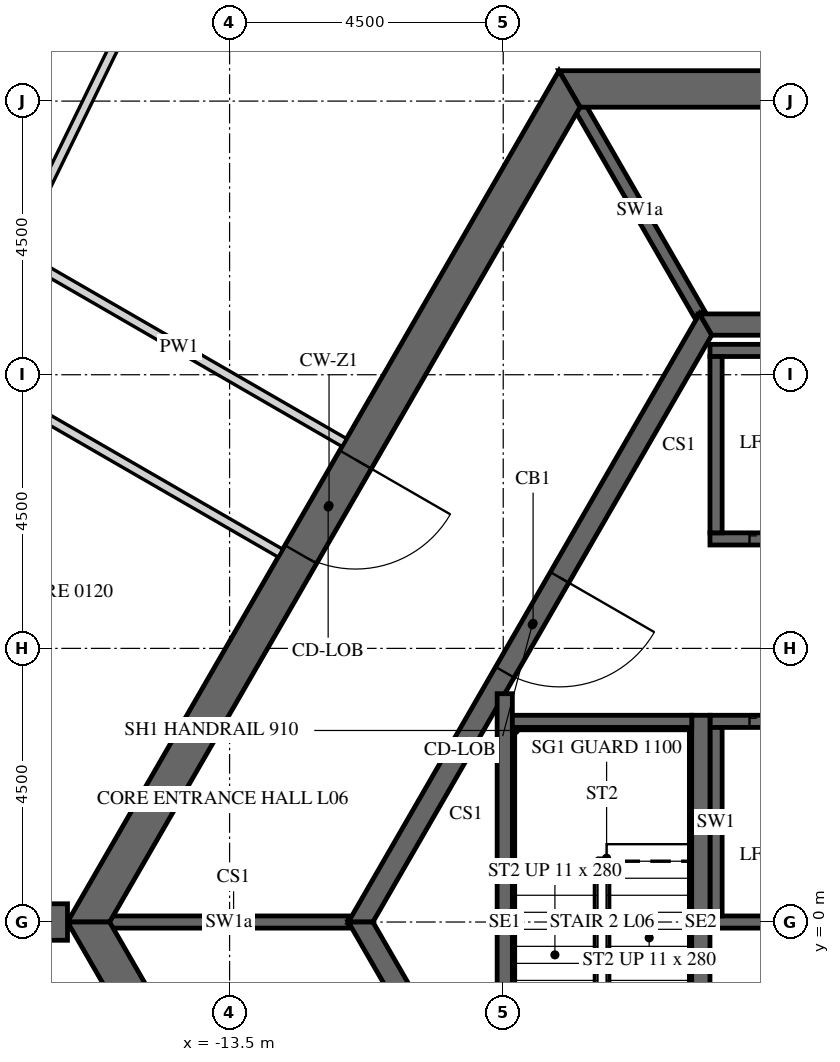
"""IFC4 building model, lengths in metres.
Left out: names, types, materials, properties, quantities, classifications, styles, units other than length and angle.
Written with IfcOpenShell. Run it as: python <this file> out.ifc"""

import sys

from ifc_helpers import new_model, si_unit, direction, frame, frame_2d, origin, place, context, subcontext, project, spatial, polyline, rectangle, outline, extrude, element, fill, save


model = new_model("IFC4")
c1 = context("Model", 3, precision=1e-05, world=origin(), true_north=direction((0.0, 1.0)))
c2 = subcontext(c1, "Body", "Model", "MODEL_VIEW")
j1 = project(units=[si_unit("LENGTHUNIT", "METRE"), si_unit("PLANEANGLEUNIT", "RADIAN")], contexts=[c1])
p1 = place(None, origin())
s1 = spatial("IfcSite", under=j1, at=p1, CompositionType="ELEMENT")
p2 = place(p1, origin())
s2 = spatial("IfcBuilding", under=s1, at=p2, CompositionType="ELEMENT")
p3 = place(p2, frame((0.0, 0.0, 37.5)))
s3 = spatial("IfcBuildingStorey", under=s2, at=p3, CompositionType="ELEMENT", Elevation=37.5)
p4 = place(p3, frame((-7.91, 13.7, -0.15), z_axis=(0.0, 0.0, 1.0), x_axis=(-0.499999880136, -0.866025472988, 0.0)))
e1 = element("IfcWall", 1, at=p4, inside=s3, PredefinedType="SHEAR", context=c2, shape_type="SweptSolid", body=[
    extrude(outline(polyline([(-0.173, -0.3), (15.993, -0.3), (15.646, 0.3), (0.173, 0.3), (-0.173, -0.3)])), origin(), (0.0, 0.0, 1.0), 3.9),
])
p5 = place(p4, frame((7.039, 0.0, 0.15)))
e2 = element("IfcOpeningElement", 2, at=p5, cuts=e1, PredefinedType="OPENING", context=c2, shape_type="SweptSolid", body=[
    extrude(rectangle(XDim=1.8, YDim=2.4, at=frame_2d((0.9, 1.2))), frame((0.0, 0.31, 0.0), z_axis=(0.0, -1.0, 0.0), x_axis=(1.0, 0.0, 0.0)), (0.0, 0.0, 1.0), 0.62),
])
p6 = place(p3, frame((-15.819, 0.0, -0.15), z_axis=(0.0, 0.0, 1.0), x_axis=(0.499999880136, -0.866025472988, 0.0)))
e3 = element("IfcWall", 3, at=p6, inside=s3, PredefinedType="SHEAR", context=c2, shape_type="SweptSolid", body=[
    extrude(outline(polyline([(-0.173, -0.3), (15.993, -0.3), (15.646, 0.3), (0.173, 0.3), (-0.173, -0.3)])), origin(), (0.0, 0.0, 1.0), 3.9),
])
p7 = place(p6, frame((6.981, 0.0, 0.15)))
e4 = element("IfcOpeningElement", 4, at=p7, cuts=e3, PredefinedType="OPENING", context=c2, shape_type="SweptSolid", body=[
    extrude(rectangle(XDim=1.8, YDim=2.4, at=frame_2d((0.9, 1.2))), frame((0.0, 0.31, 0.0), z_axis=(0.0, -1.0, 0.0), x_axis=(1.0, 0.0, 0.0)), (0.0, 0.0, 1.0), 0.62),
])
p8 = place(p3, frame((7.91, 13.7, -0.15), z_axis=(0.0, 0.0, 1.0), x_axis=(-1.0, 0.0, 0.0)))
e5 = element("IfcWall", 5, at=p8, inside=s3, PredefinedType="SHEAR", context=c2, shape_type="SweptSolid", body=[
    extrude(outline(polyline([(-0.173, -0.3), (15.993, -0.3), (15.646, 0.3), (0.173, 0.3), (-0.173, -0.3)])), origin(), (0.0, 0.0, 1.0), 3.9),
])
p9 = place(p8, frame((7.31, 0.0, 0.15)))
e6 = element("IfcOpeningElement", 6, at=p9, cuts=e5, PredefinedType="OPENING", context=c2, shape_type="SweptSolid", body=[
    extrude(rectangle(XDim=1.2, YDim=2.4, at=frame_2d((0.6, 1.2))), frame((0.0, 0.31, 0.0), z_axis=(0.0, -1.0, 0.0), x_axis=(1.0, 0.0, 0.0)), (0.0, 0.0, 1.0), 0.62),
])
p10 = place(p3, frame((-16.166, 0.0, -0.15), z_axis=(0.0, 0.0, 1.0), x_axis=(-1.0, 0.0, 0.0)))
e7 = element("IfcWall", 7, at=p10, inside=s3, PredefinedType="SHEAR", context=c2, shape_type="SweptSolid", body=[
    extrude(rectangle(XDim=16.509, YDim=0.6, at=frame_2d((8.254, 0.0))), origin(), (0.0, 0.0, 1.0), 3.9),
])
p11 = place(p10, frame((7.354, 0.0, 0.15)))
e8 = element("IfcOpeningElement", 8, at=p11, cuts=e7, PredefinedType="OPENING", context=c2, shape_type="SweptSolid", body=[
    extrude(rectangle(XDim=1.8, YDim=2.4, at=frame_2d((0.9, 1.2))), frame((0.0, 0.31, 0.0), z_axis=(0.0, -1.0, 0.0), x_axis=(1.0, 0.0, 0.0)), (0.0, 0.0, 1.0), 0.62),
])
p12 = place(p3, frame((-5.673, 9.825, -0.15), z_axis=(0.0, 0.0, 1.0), x_axis=(-0.499995046907, -0.866028263435, 0.0)))
e9 = element("IfcWall", 9, at=p12, inside=s3, PredefinedType="SHEAR", context=c2, shape_type="SweptSolid", body=[
    extrude(outline(polyline([(-0.101, -0.175), (11.446, -0.175), (11.244, 0.175), (0.101, 0.175), (-0.101, -0.175)])), origin(), (0.0, 0.0, 1.0), 3.9),
])
p13 = place(p12, frame((4.801, 0.0, 0.15)))
e10 = element("IfcOpeningElement", 10, at=p13, cuts=e9, PredefinedType="OPENING", context=c2, shape_type="SweptSolid", body=[
    extrude(rectangle(XDim=1.8, YDim=2.4, at=frame_2d((0.9, 1.2))), frame((0.0, 0.185, 0.0), z_axis=(0.0, -1.0, 0.0), x_axis=(1.0, 0.0, 0.0)), (0.0, 0.0, 1.0), 0.37),
])
p14 = place(p3, frame((-11.345, 0.0, -0.15), z_axis=(0.0, 0.0, 1.0), x_axis=(0.499995046907, -0.866028263435, 0.0)))
e11 = element("IfcWall", 11, at=p14, inside=s3, PredefinedType="SHEAR", context=c2, shape_type="SweptSolid", body=[
    extrude(outline(polyline([(-0.101, -0.175), (11.446, -0.175), (11.244, 0.175), (0.101, 0.175), (-0.101, -0.175)])), origin(), (0.0, 0.0, 1.0), 3.9),
])
p15 = place(p14, frame((4.744, 0.0, 0.15)))
e12 = element("IfcOpeningElement", 12, at=p15, cuts=e11, PredefinedType="OPENING", context=c2, shape_type="SweptSolid", body=[
    extrude(rectangle(XDim=1.8, YDim=2.4, at=frame_2d((0.9, 1.2))), frame((0.0, 0.185, 0.0), z_axis=(0.0, -1.0, 0.0), x_axis=(1.0, 0.0, 0.0)), (0.0, 0.0, 1.0), 0.37),
])
p16 = place(p3, frame((5.673, 9.825, -0.15), z_axis=(0.0, 0.0, 1.0), x_axis=(-1.0, 0.0, 0.0)))
e13 = element("IfcWall", 13, at=p16, inside=s3, PredefinedType="SHEAR", context=c2, shape_type="SweptSolid", body=[
    extrude(outline(polyline([(-0.101, -0.175), (11.446, -0.175), (11.244, 0.175), (0.101, 0.175), (-0.101, -0.175)])), origin(), (0.0, 0.0, 1.0), 3.9),
])
p17 = place(p3, frame((-5.6, 6.3, -0.25), z_axis=(0.0, 0.0, 1.0), x_axis=(1.0, 0.0, 0.0)))
e14 = element("IfcWall", 14, at=p17, inside=s3, PredefinedType="SHEAR", context=c2, shape_type="SweptSolid", body=[
    extrude(rectangle(XDim=11.2, YDim=0.2, at=frame_2d((5.6, 0.0))), origin(), (0.0, 0.0, 1.0), 3.9),
])
p18 = place(p17, frame((0.65, 0.0, 0.25)))
e15 = element("IfcOpeningElement", 15, at=p18, cuts=e14, PredefinedType="OPENING", context=c2, shape_type="SweptSolid", body=[
    extrude(rectangle(XDim=1.1, YDim=2.1, at=frame_2d((0.55, 1.05))), frame((0.0, 0.11, 0.0), z_axis=(0.0, -1.0, 0.0), x_axis=(1.0, 0.0, 0.0)), (0.0, 0.0, 1.0), 0.22),
])
p19 = place(p17, frame((2.85, 0.0, 0.25)))
e16 = element("IfcOpeningElement", 16, at=p19, cuts=e14, PredefinedType="OPENING", context=c2, shape_type="SweptSolid", body=[
    extrude(rectangle(XDim=1.1, YDim=2.1, at=frame_2d((0.55, 1.05))), frame((0.0, 0.11, 0.0), z_axis=(0.0, -1.0, 0.0), x_axis=(1.0, 0.0, 0.0)), (0.0, 0.0, 1.0), 0.22),
])
p20 = place(p17, frame((5.05, 0.0, 0.25)))
e17 = element("IfcOpeningElement", 17, at=p20, cuts=e14, PredefinedType="OPENING", context=c2, shape_type="SweptSolid", body=[
    extrude(rectangle(XDim=1.1, YDim=2.1, at=frame_2d((0.55, 1.05))), frame((0.0, 0.11, 0.0), z_axis=(0.0, -1.0, 0.0), x_axis=(1.0, 0.0, 0.0)), (0.0, 0.0, 1.0), 0.22),
])
p21 = place(p17, frame((7.25, 0.0, 0.25)))
e18 = element("IfcOpeningElement", 18, at=p21, cuts=e14, PredefinedType="OPENING", context=c2, shape_type="SweptSolid", body=[
    extrude(rectangle(XDim=1.1, YDim=2.1, at=frame_2d((0.55, 1.05))), frame((0.0, 0.11, 0.0), z_axis=(0.0, -1.0, 0.0), x_axis=(1.0, 0.0, 0.0)), (0.0, 0.0, 1.0), 0.22),
])
p22 = place(p17, frame((9.45, 0.0, 0.25)))
e19 = element("IfcOpeningElement", 19, at=p22, cuts=e14, PredefinedType="OPENING", context=c2, shape_type="SweptSolid", body=[
    extrude(rectangle(XDim=1.1, YDim=2.1, at=frame_2d((0.55, 1.05))), frame((0.0, 0.11, 0.0), z_axis=(0.0, -1.0, 0.0), x_axis=(1.0, 0.0, 0.0)), (0.0, 0.0, 1.0), 0.22),
])
p23 = place(p3, frame((-5.6, 9.4, -0.25), z_axis=(0.0, 0.0, 1.0), x_axis=(1.0, 0.0, 0.0)))
e20 = element("IfcWall", 20, at=p23, inside=s3, PredefinedType="SHEAR", context=c2, shape_type="SweptSolid", body=[
    extrude(rectangle(XDim=11.2, YDim=0.2, at=frame_2d((5.6, 0.0))), origin(), (0.0, 0.0, 1.0), 3.9),
])
p24 = place(p3, frame((-5.5, 6.4, -0.25), z_axis=(0.0, 0.0, 1.0), x_axis=(0.0, 1.0, 0.0)))
e21 = element("IfcWall", 21, at=p24, inside=s3, PredefinedType="SHEAR", context=c2, shape_type="SweptSolid", body=[
    extrude(rectangle(XDim=2.9, YDim=0.2, at=frame_2d((1.45, 0.0))), origin(), (0.0, 0.0, 1.0), 3.9),
])
p25 = place(p3, frame((-5.6, 3.3, -0.25), z_axis=(0.0, 0.0, 1.0), x_axis=(1.0, 0.0, 0.0)))
e22 = element("IfcWall", 22, at=p25, inside=s3, PredefinedType="SHEAR", context=c2, shape_type="SweptSolid", body=[
    extrude(rectangle(XDim=11.2, YDim=0.2, at=frame_2d((5.6, 0.0))), origin(), (0.0, 0.0, 1.0), 3.9),
])
p26 = place(p25, frame((0.65, 0.0, 0.25)))
e23 = element("IfcOpeningElement", 23, at=p26, cuts=e22, PredefinedType="OPENING", context=c2, shape_type="SweptSolid", body=[
    extrude(rectangle(XDim=1.1, YDim=2.1, at=frame_2d((0.55, 1.05))), frame((0.0, 0.11, 0.0), z_axis=(0.0, -1.0, 0.0), x_axis=(1.0, 0.0, 0.0)), (0.0, 0.0, 1.0), 0.22),
])
p27 = place(p25, frame((2.85, 0.0, 0.25)))
e24 = element("IfcOpeningElement", 24, at=p27, cuts=e22, PredefinedType="OPENING", context=c2, shape_type="SweptSolid", body=[
    extrude(rectangle(XDim=1.1, YDim=2.1, at=frame_2d((0.55, 1.05))), frame((0.0, 0.11, 0.0), z_axis=(0.0, -1.0, 0.0), x_axis=(1.0, 0.0, 0.0)), (0.0, 0.0, 1.0), 0.22),
])
p28 = place(p25, frame((5.05, 0.0, 0.25)))
e25 = element("IfcOpeningElement", 25, at=p28, cuts=e22, PredefinedType="OPENING", context=c2, shape_type="SweptSolid", body=[
    extrude(rectangle(XDim=1.1, YDim=2.1, at=frame_2d((0.55, 1.05))), frame((0.0, 0.11, 0.0), z_axis=(0.0, -1.0, 0.0), x_axis=(1.0, 0.0, 0.0)), (0.0, 0.0, 1.0), 0.22),
])
p29 = place(p25, frame((7.25, 0.0, 0.25)))
e26 = element("IfcOpeningElement", 26, at=p29, cuts=e22, PredefinedType="OPENING", context=c2, shape_type="SweptSolid", body=[
    extrude(rectangle(XDim=1.1, YDim=2.1, at=frame_2d((0.55, 1.05))), frame((0.0, 0.11, 0.0), z_axis=(0.0, -1.0, 0.0), x_axis=(1.0, 0.0, 0.0)), (0.0, 0.0, 1.0), 0.22),
])
p30 = place(p25, frame((9.45, 0.0, 0.25)))
e27 = element("IfcOpeningElement", 27, at=p30, cuts=e22, PredefinedType="OPENING", context=c2, shape_type="SweptSolid", body=[
    extrude(rectangle(XDim=1.1, YDim=2.1, at=frame_2d((0.55, 1.05))), frame((0.0, 0.11, 0.0), z_axis=(0.0, -1.0, 0.0), x_axis=(1.0, 0.0, 0.0)), (0.0, 0.0, 1.0), 0.22),
])
p31 = place(p3, frame((-5.6, 0.0, -0.25), z_axis=(0.0, 0.0, 1.0), x_axis=(1.0, 0.0, 0.0)))
e28 = element("IfcWall", 28, at=p31, inside=s3, PredefinedType="SHEAR", context=c2, shape_type="SweptSolid", body=[
    extrude(rectangle(XDim=11.2, YDim=0.2, at=frame_2d((5.6, 0.0))), origin(), (0.0, 0.0, 1.0), 3.9),
])
p32 = place(p3, frame((-5.5, 0.1, -0.25), z_axis=(0.0, 0.0, 1.0), x_axis=(0.0, 1.0, 0.0)))
e29 = element("IfcWall", 29, at=p32, inside=s3, PredefinedType="SHEAR", context=c2, shape_type="SweptSolid", body=[
    extrude(rectangle(XDim=3.1, YDim=0.2, at=frame_2d((1.55, 0.0))), origin(), (0.0, 0.0, 1.0), 3.9),
])
p33 = place(p3, frame((-5.773, 10.0, -0.15), z_axis=(0.0, 0.0, 1.0), x_axis=(-0.500038251005, 0.86600331843, 0.0)))
e30 = element("IfcWall", 30, at=p33, inside=s3, PredefinedType="SHEAR", context=c2, shape_type="SweptSolid", body=[
    extrude(rectangle(XDim=3.926, YDim=0.2, at=frame_2d((1.963, 0.0))), origin(), (0.0, 0.0, 1.0), 3.9),
])
p34 = place(p3, frame((-11.547, 0.0, -0.15), z_axis=(0.0, 0.0, 1.0), x_axis=(-1.0, 0.0, 0.0)))
e31 = element("IfcWall", 31, at=p34, inside=s3, PredefinedType="SHEAR", context=c2, shape_type="SweptSolid", body=[
    extrude(rectangle(XDim=3.926, YDim=0.2, at=frame_2d((1.963, 0.0))), origin(), (0.0, 0.0, 1.0), 3.9),
])
p35 = place(p3, frame((-5.75, -3.4, -0.25), z_axis=(0.0, 0.0, 1.0), x_axis=(0.0, 1.0, 0.0)))
e32 = element("IfcWall", 32, at=p35, inside=s3, PredefinedType="SHEAR", context=c2, shape_type="SweptSolid", body=[
    extrude(rectangle(XDim=6.8, YDim=0.3, at=frame_2d((3.4, 0.0))), origin(), (0.0, 0.0, 1.0), 3.9),
])
p36 = place(p3, frame((-8.975, -3.755, -0.25), z_axis=(0.0, 0.0, 1.0), x_axis=(0.0, 1.0, 0.0)))
e33 = element("IfcWall", 33, at=p36, inside=s3, PredefinedType="SHEAR", context=c2, shape_type="SweptSolid", body=[
    extrude(rectangle(XDim=7.51, YDim=0.25, at=frame_2d((3.755, 0.0))), origin(), (0.0, 0.0, 1.0), 3.9),
])
p37 = place(p3, frame((-8.85, 3.3, -0.25), z_axis=(0.0, 0.0, 1.0), x_axis=(1.0, 0.0, 0.0)))
e34 = element("IfcWall", 34, at=p37, inside=s3, PredefinedType="SHEAR", context=c2, shape_type="SweptSolid", body=[
    extrude(rectangle(XDim=2.95, YDim=0.2, at=frame_2d((1.475, 0.0))), origin(), (0.0, 0.0, 1.0), 3.9),
])
p38 = place(p3, frame((-13.752, 21.875, 0.0), z_axis=(0.0, 0.0, 1.0), x_axis=(-0.438374473378, -0.898792423806, 0.0)))
e35 = element("IfcWall", 35, at=p38, inside=s3, PredefinedType="PARTITIONING", context=c2, shape_type="SweptSolid", body=[
    extrude(rectangle(XDim=21.918, YDim=0.15, at=frame_2d((10.959, 0.0))), origin(), (0.0, 0.0, 1.0), 2.988),
])
p39 = place(p38, frame((9.521, 0.0, 0.0)))
e36 = element("IfcOpeningElement", 36, at=p39, cuts=e35, PredefinedType="OPENING", context=c2, shape_type="SweptSolid", body=[
    extrude(rectangle(XDim=1.0, YDim=2.1, at=frame_2d((0.5, 1.05))), frame((0.0, 0.085, 0.0), z_axis=(0.0, -1.0, 0.0), x_axis=(1.0, 0.0, 0.0)), (0.0, 0.0, 1.0), 0.17),
])
p40 = place(p38, frame((17.211, 0.0, 0.0)))
e37 = element("IfcOpeningElement", 37, at=p40, cuts=e35, PredefinedType="OPENING", context=c2, shape_type="SweptSolid", body=[
    extrude(rectangle(XDim=1.0, YDim=2.1, at=frame_2d((0.5, 1.05))), frame((0.0, 0.085, 0.0), z_axis=(0.0, -1.0, 0.0), x_axis=(1.0, 0.0, 0.0)), (0.0, 0.0, 1.0), 0.17),
])
p41 = place(p3, frame((-11.614, 7.884, 0.0), z_axis=(0.0, 0.0, 1.0), x_axis=(-0.866025438137, 0.4999999405, 0.0)))
e38 = element("IfcWall", 38, at=p41, inside=s3, PredefinedType="PARTITIONING", context=c2, shape_type="SweptSolid", body=[
    extrude(rectangle(XDim=6.271, YDim=0.15, at=frame_2d((3.135, 0.0))), origin(), (0.0, 0.0, 1.0), 2.988),
])
p42 = place(p3, frame((-17.011, 11.087, 0.0), z_axis=(0.0, 0.0, 1.0), x_axis=(0.43836877185, 0.898795204631, 0.0)))
e39 = element("IfcWall", 39, at=p42, inside=s3, PredefinedType="PARTITIONING", context=c2, shape_type="SweptSolid", body=[
    extrude(rectangle(XDim=10.083, YDim=0.15, at=frame_2d((5.042, 0.0))), origin(), (0.0, 0.0, 1.0), 2.988),
])
p43 = place(p3, frame((-17.902, 9.09, 0.0), z_axis=(0.0, 0.0, 1.0), x_axis=(0.866036368755, -0.499981007633, 0.0)))
e40 = element("IfcWall", 40, at=p43, inside=s3, PredefinedType="PARTITIONING", context=c2, shape_type="SweptSolid", body=[
    extrude(rectangle(XDim=6.049, YDim=0.15, at=frame_2d((3.024, 0.0))), origin(), (0.0, 0.0, 1.0), 2.988),
])
p44 = place(p5, origin())
e41 = element("IfcDoor", 41, at=p44, inside=s3, OperationType="DOUBLE_DOOR_SINGLE_SWING", PredefinedType="DOOR", context=c2, shape_type="SweptSolid", body=[
    extrude(rectangle(XDim=1.8, YDim=2.4, at=frame_2d((0.9, 1.2))), frame((0.0, 0.025, 0.0), z_axis=(0.0, -1.0, 0.0), x_axis=(1.0, 0.0, 0.0)), (0.0, 0.0, 1.0), 0.05),
])
fill(e2, e41)
p45 = place(p13, origin())
e42 = element("IfcDoor", 42, at=p45, inside=s3, OperationType="DOUBLE_DOOR_SINGLE_SWING", PredefinedType="DOOR", context=c2, shape_type="SweptSolid", body=[
    extrude(rectangle(XDim=1.8, YDim=2.4, at=frame_2d((0.9, 1.2))), frame((0.0, 0.025, 0.0), z_axis=(0.0, -1.0, 0.0), x_axis=(1.0, 0.0, 0.0)), (0.0, 0.0, 1.0), 0.05),
])
fill(e10, e42)
p46 = place(p18, origin())
e43 = element("IfcDoor", 43, at=p46, inside=s3, OperationType="SLIDING_TO_LEFT", PredefinedType="DOOR", context=c2, shape_type="SweptSolid", body=[
    extrude(rectangle(XDim=1.1, YDim=2.1, at=frame_2d((0.55, 1.05))), frame((0.0, 0.025, 0.0), z_axis=(0.0, -1.0, 0.0), x_axis=(1.0, 0.0, 0.0)), (0.0, 0.0, 1.0), 0.05),
])
fill(e15, e43)
p47 = place(p26, origin())
e44 = element("IfcDoor", 44, at=p47, inside=s3, OperationType="SLIDING_TO_LEFT", PredefinedType="DOOR", context=c2, shape_type="SweptSolid", body=[
    extrude(rectangle(XDim=1.1, YDim=2.1, at=frame_2d((0.55, 1.05))), frame((0.0, 0.025, 0.0), z_axis=(0.0, -1.0, 0.0), x_axis=(1.0, 0.0, 0.0)), (0.0, 0.0, 1.0), 0.05),
])
fill(e23, e44)
save(model, sys.argv[1])
